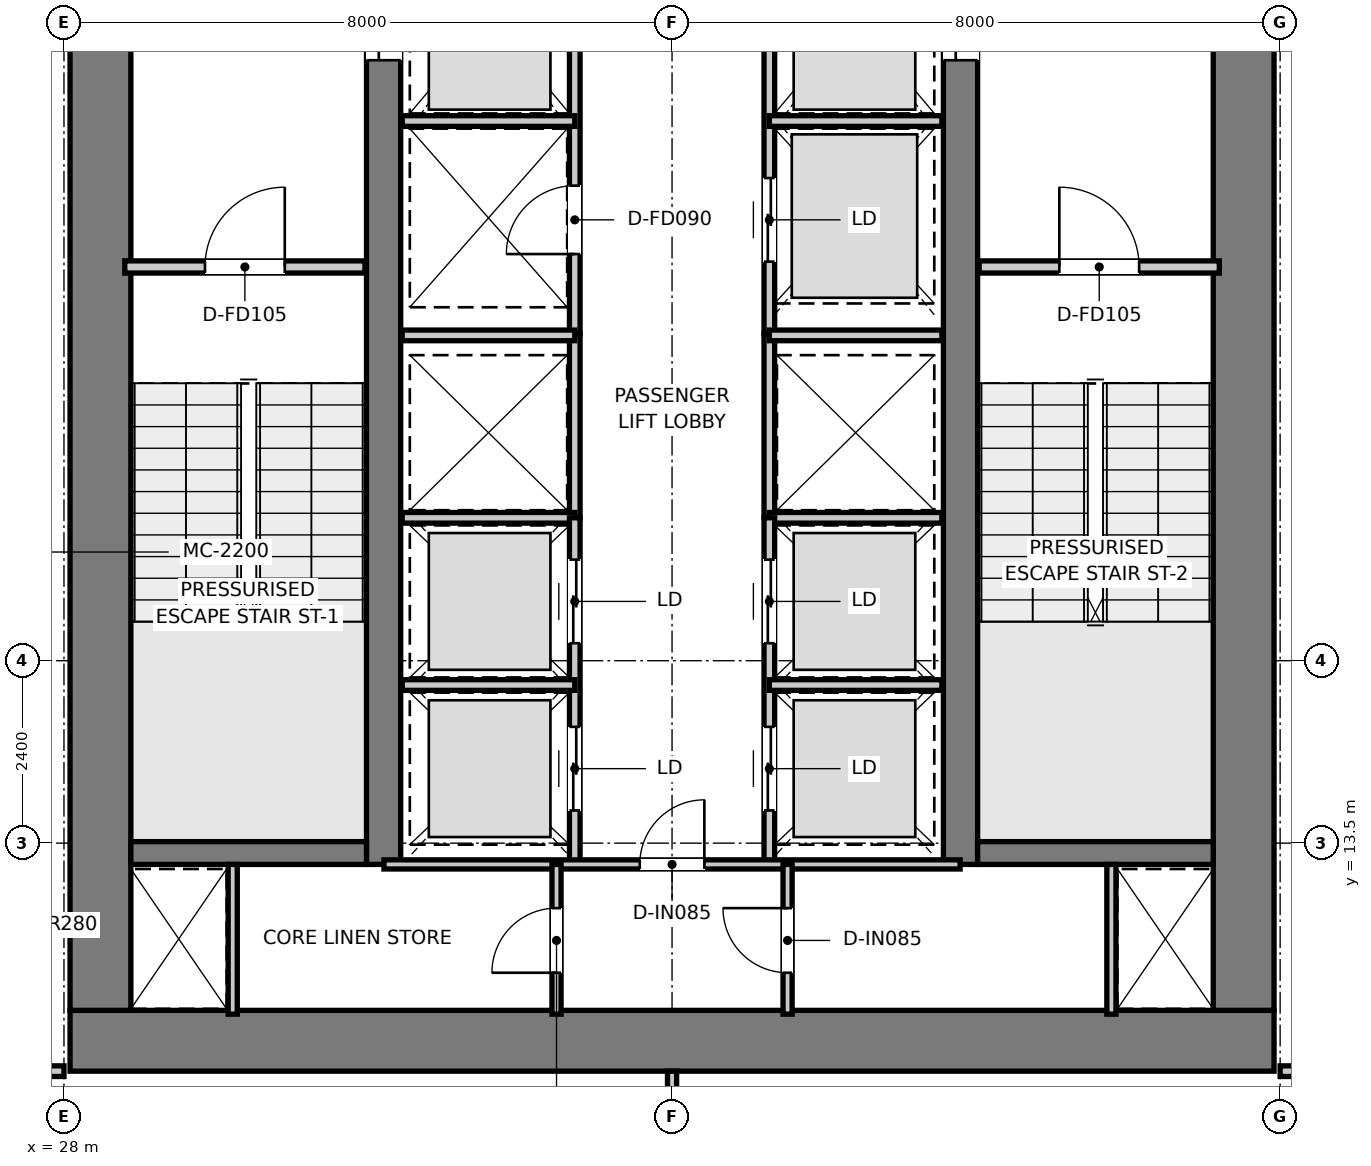
"""IFC4 building model, lengths in metres.
Left out: names, types, materials, properties, quantities, classifications, styles, units other than length and angle.
Written with IfcOpenShell. Run it as: python <this file> out.ifc"""

import sys

from ifc_helpers import new_model, si_unit, direction, frame, frame_2d, origin, place, context, subcontext, project, spatial, rectangle, extrude, element, fill, save


model = new_model("IFC4")
c1 = context("Model", 3, precision=1e-05, world=origin(), true_north=direction((0.0, 1.0)))
c2 = subcontext(c1, "Body", "Model", "MODEL_VIEW")
j1 = project(units=[si_unit("LENGTHUNIT", "METRE"), si_unit("PLANEANGLEUNIT", "RADIAN")], contexts=[c1])
p1 = place(None, origin())
s1 = spatial("IfcSite", under=j1, at=p1, CompositionType="ELEMENT")
p2 = place(p1, origin())
s2 = spatial("IfcBuilding", under=s1, at=p2, CompositionType="ELEMENT")
p3 = place(p2, frame((0.0, 0.0, 72.4)))
s3 = spatial("IfcBuildingStorey", under=s2, at=p3, CompositionType="ELEMENT", Elevation=72.4)
p4 = place(p3, frame((28.08, 10.9, 0.0), z_axis=(0.0, 0.0, 1.0), x_axis=(1.0, 0.0, 0.0)))
e1 = element("IfcWall", 1, at=p4, inside=s3, PredefinedType="SHEAR", context=c2, shape_type="SweptSolid", body=[
    extrude(rectangle(XDim=15.84, YDim=0.8, at=frame_2d((7.92, 0.0))), origin(), (0.0, 0.0, 1.0), 3.95),
])
for number, where, z_axis, x_axis in (
    (2, (28.48, 11.3, 0.0), (0.0, 0.0, 1.0), (0.0, 1.0, 0.0)),
    (3, (43.52, 11.3, 0.0), (0.0, 0.0, 1.0), (0.0, 1.0, 0.0)),
):
    element("IfcWall", number, at=place(p3, frame(where, z_axis=z_axis, x_axis=x_axis)), inside=s3, PredefinedType="SHEAR", context=c2, shape_type="SweptSolid", body=[
        extrude(rectangle(XDim=14.7, YDim=0.8, at=frame_2d((7.35, 0.0))), origin(), (0.0, 0.0, 1.0), 3.95),
    ])
p5 = place(p3, frame((32.205, 13.22, 0.0), z_axis=(0.0, 0.0, 1.0), x_axis=(0.0, 1.0, 0.0)))
e4 = element("IfcWall", 4, at=p5, inside=s3, PredefinedType="SHEAR", context=c2, shape_type="SweptSolid", body=[
    extrude(rectangle(XDim=12.78, YDim=0.45, at=frame_2d((6.39, 0.0))), origin(), (0.0, 0.0, 1.0), 3.95),
])
p6 = place(p5, frame((10.58, 0.0, 0.0)))
e5 = element("IfcOpeningElement", 5, at=p6, cuts=e4, PredefinedType="OPENING", context=c2, shape_type="SweptSolid", body=[
    extrude(rectangle(XDim=1.1, YDim=2.15, at=frame_2d((0.55, 1.075))), frame((0.0, 0.235, 0.0), z_axis=(0.0, -1.0, 0.0), x_axis=(1.0, 0.0, 0.0)), (0.0, 0.0, 1.0), 0.47),
])
p7 = place(p3, frame((39.795, 13.22, 0.0), z_axis=(0.0, 0.0, 1.0), x_axis=(0.0, 1.0, 0.0)))
e6 = element("IfcWall", 6, at=p7, inside=s3, PredefinedType="SHEAR", context=c2, shape_type="SweptSolid", body=[
    extrude(rectangle(XDim=12.78, YDim=0.45, at=frame_2d((6.39, 0.0))), origin(), (0.0, 0.0, 1.0), 3.95),
])
p8 = place(p7, frame((10.58, 0.0, 0.0)))
e7 = element("IfcOpeningElement", 7, at=p8, cuts=e6, PredefinedType="OPENING", context=c2, shape_type="SweptSolid", body=[
    extrude(rectangle(XDim=1.1, YDim=2.15, at=frame_2d((0.55, 1.075))), frame((0.0, 0.235, 0.0), z_axis=(0.0, -1.0, 0.0), x_axis=(1.0, 0.0, 0.0)), (0.0, 0.0, 1.0), 0.47),
])
for number, where, z_axis, x_axis in (
    (8, (28.88, 13.37, 0.0), (0.0, 0.0, 1.0), (1.0, 0.0, 0.0)),
    (9, (40.02, 13.37, 0.0), (0.0, 0.0, 1.0), (1.0, 0.0, 0.0)),
):
    element("IfcWall", number, at=place(p3, frame(where, z_axis=z_axis, x_axis=x_axis)), inside=s3, PredefinedType="SHEAR", context=c2, shape_type="SweptSolid", body=[
        extrude(rectangle(XDim=3.1, YDim=0.3, at=frame_2d((1.55, 0.0))), origin(), (0.0, 0.0, 1.0), 3.95),
    ])
p9 = place(p3, frame((28.8, 21.08, 0.0), z_axis=(0.0, 0.0, 1.0), x_axis=(1.0, 0.0, 0.0)))
e10 = element("IfcWall", 10, at=p9, inside=s3, PredefinedType="PARTITIONING", context=c2, shape_type="SweptSolid", body=[
    extrude(rectangle(XDim=3.16, YDim=0.16, at=frame_2d((1.58, 0.0))), origin(), (0.0, 0.0, 1.0), 3.67),
])
p10 = place(p9, frame((1.055, 0.0, 0.0)))
e11 = element("IfcOpeningElement", 11, at=p10, cuts=e10, PredefinedType="OPENING", context=c2, shape_type="SweptSolid", body=[
    extrude(rectangle(XDim=1.05, YDim=2.1, at=frame_2d((0.525, 1.05))), frame((0.0, 0.09, 0.0), z_axis=(0.0, -1.0, 0.0), x_axis=(1.0, 0.0, 0.0)), (0.0, 0.0, 1.0), 0.18),
])
p11 = place(p3, frame((40.04, 21.08, 0.0), z_axis=(0.0, 0.0, 1.0), x_axis=(1.0, 0.0, 0.0)))
e12 = element("IfcWall", 12, at=p11, inside=s3, PredefinedType="PARTITIONING", context=c2, shape_type="SweptSolid", body=[
    extrude(rectangle(XDim=3.16, YDim=0.16, at=frame_2d((1.58, 0.0))), origin(), (0.0, 0.0, 1.0), 3.67),
])
p12 = place(p11, frame((1.055, 0.0, 0.0)))
e13 = element("IfcOpeningElement", 13, at=p12, cuts=e12, PredefinedType="OPENING", context=c2, shape_type="SweptSolid", body=[
    extrude(rectangle(XDim=1.05, YDim=2.1, at=frame_2d((0.525, 1.05))), frame((0.0, 0.09, 0.0), z_axis=(0.0, -1.0, 0.0), x_axis=(1.0, 0.0, 0.0)), (0.0, 0.0, 1.0), 0.18),
])
p13 = place(p3, frame((34.72, 20.2, 0.0), z_axis=(0.0, 0.0, 1.0), x_axis=(0.0, 1.0, 0.0)))
e14 = element("IfcWall", 14, at=p13, inside=s3, PredefinedType="PARTITIONING", context=c2, shape_type="SweptSolid", body=[
    extrude(rectangle(XDim=5.78, YDim=0.14, at=frame_2d((2.89, 0.0))), origin(), (0.0, 0.0, 1.0), 2.47),
])
p14 = place(p13, frame((1.05, 0.0, 0.0)))
e15 = element("IfcOpeningElement", 15, at=p14, cuts=e14, PredefinedType="OPENING", context=c2, shape_type="SweptSolid", body=[
    extrude(rectangle(XDim=0.9, YDim=2.1, at=frame_2d((0.45, 1.05))), frame((0.0, 0.08, 0.0), z_axis=(0.0, -1.0, 0.0), x_axis=(1.0, 0.0, 0.0)), (0.0, 0.0, 1.0), 0.16),
])
p15 = place(p3, frame((37.28, 20.2, 0.0), z_axis=(0.0, 0.0, 1.0), x_axis=(0.0, 1.0, 0.0)))
e16 = element("IfcWall", 16, at=p15, inside=s3, PredefinedType="PARTITIONING", context=c2, shape_type="SweptSolid", body=[
    extrude(rectangle(XDim=5.78, YDim=0.14, at=frame_2d((2.89, 0.0))), origin(), (0.0, 0.0, 1.0), 2.47),
])
p16 = place(p15, frame((0.95, 0.0, 0.0)))
e17 = element("IfcOpeningElement", 17, at=p16, cuts=e16, PredefinedType="OPENING", context=c2, shape_type="SweptSolid", body=[
    extrude(rectangle(XDim=1.1, YDim=2.15, at=frame_2d((0.55, 1.075))), frame((0.0, 0.08, 0.0), z_axis=(0.0, -1.0, 0.0), x_axis=(1.0, 0.0, 0.0)), (0.0, 0.0, 1.0), 0.16),
])
for number, where, z_axis, x_axis in (
    (18, (32.45, 23.0, 0.0), (0.0, 0.0, 1.0), (1.0, 0.0, 0.0)),
    (19, (37.28, 23.0, 0.0), (0.0, 0.0, 1.0), (1.0, 0.0, 0.0)),
):
    element("IfcWall", number, at=place(p3, frame(where, z_axis=z_axis, x_axis=x_axis)), inside=s3, PredefinedType="PARTITIONING", context=c2, shape_type="SweptSolid", body=[
        extrude(rectangle(XDim=2.27, YDim=0.14, at=frame_2d((1.135, 0.0))), origin(), (0.0, 0.0, 1.0), 2.47),
    ])
for number, where, z_axis, x_axis in (
    (20, (34.72, 17.78, 0.0), (0.0, 0.0, 1.0), (0.0, 1.0, 0.0)),
    (21, (37.28, 17.78, 0.0), (0.0, 0.0, 1.0), (0.0, 1.0, 0.0)),
):
    element("IfcWall", number, at=place(p3, frame(where, z_axis=z_axis, x_axis=x_axis)), inside=s3, PredefinedType="PARTITIONING", context=c2, shape_type="SweptSolid", body=[
        extrude(rectangle(XDim=2.42, YDim=0.14, at=frame_2d((1.21, 0.0))), origin(), (0.0, 0.0, 1.0), 3.67),
    ])
for number, where, z_axis, x_axis in (
    (22, (32.45, 17.78, 0.0), (0.0, 0.0, 1.0), (1.0, 0.0, 0.0)),
    (23, (32.45, 20.18, 0.0), (0.0, 0.0, 1.0), (1.0, 0.0, 0.0)),
    (24, (37.28, 17.78, 0.0), (0.0, 0.0, 1.0), (1.0, 0.0, 0.0)),
    (25, (37.28, 20.18, 0.0), (0.0, 0.0, 1.0), (1.0, 0.0, 0.0)),
):
    element("IfcWall", number, at=place(p3, frame(where, z_axis=z_axis, x_axis=x_axis)), inside=s3, PredefinedType="PARTITIONING", context=c2, shape_type="SweptSolid", body=[
        extrude(rectangle(XDim=2.27, YDim=0.14, at=frame_2d((1.135, 0.0))), origin(), (0.0, 0.0, 1.0), 3.67),
    ])
p17 = place(p3, frame((34.72, 13.22, 0.0), z_axis=(0.0, 0.0, 1.0), x_axis=(0.0, 1.0, 0.0)))
e26 = element("IfcWall", 26, at=p17, inside=s3, PredefinedType="PARTITIONING", context=c2, shape_type="SweptSolid", body=[
    extrude(rectangle(XDim=4.56, YDim=0.14, at=frame_2d((2.28, 0.0))), origin(), (0.0, 0.0, 1.0), 3.67),
])
p18 = place(p17, frame((0.71, 0.0, 0.0)))
e27 = element("IfcOpeningElement", 27, at=p18, cuts=e26, PredefinedType="OPENING", context=c2, shape_type="SweptSolid", body=[
    extrude(rectangle(XDim=1.1, YDim=2.15, at=frame_2d((0.55, 1.075))), frame((0.0, 0.08, 0.0), z_axis=(0.0, -1.0, 0.0), x_axis=(1.0, 0.0, 0.0)), (0.0, 0.0, 1.0), 0.16),
])
p19 = place(p17, frame((2.91, 0.0, 0.0)))
e28 = element("IfcOpeningElement", 28, at=p19, cuts=e26, PredefinedType="OPENING", context=c2, shape_type="SweptSolid", body=[
    extrude(rectangle(XDim=1.1, YDim=2.15, at=frame_2d((0.55, 1.075))), frame((0.0, 0.08, 0.0), z_axis=(0.0, -1.0, 0.0), x_axis=(1.0, 0.0, 0.0)), (0.0, 0.0, 1.0), 0.16),
])
p20 = place(p3, frame((32.45, 15.58, 0.0), z_axis=(0.0, 0.0, 1.0), x_axis=(1.0, 0.0, 0.0)))
e29 = element("IfcWall", 29, at=p20, inside=s3, PredefinedType="PARTITIONING", context=c2, shape_type="SweptSolid", body=[
    extrude(rectangle(XDim=2.27, YDim=0.14, at=frame_2d((1.135, 0.0))), origin(), (0.0, 0.0, 1.0), 3.67),
])
p21 = place(p3, frame((37.28, 13.22, 0.0), z_axis=(0.0, 0.0, 1.0), x_axis=(0.0, 1.0, 0.0)))
e30 = element("IfcWall", 30, at=p21, inside=s3, PredefinedType="PARTITIONING", context=c2, shape_type="SweptSolid", body=[
    extrude(rectangle(XDim=4.56, YDim=0.14, at=frame_2d((2.28, 0.0))), origin(), (0.0, 0.0, 1.0), 3.67),
])
p22 = place(p21, frame((0.71, 0.0, 0.0)))
e31 = element("IfcOpeningElement", 31, at=p22, cuts=e30, PredefinedType="OPENING", context=c2, shape_type="SweptSolid", body=[
    extrude(rectangle(XDim=1.1, YDim=2.15, at=frame_2d((0.55, 1.075))), frame((0.0, 0.08, 0.0), z_axis=(0.0, -1.0, 0.0), x_axis=(1.0, 0.0, 0.0)), (0.0, 0.0, 1.0), 0.16),
])
p23 = place(p21, frame((2.91, 0.0, 0.0)))
e32 = element("IfcOpeningElement", 32, at=p23, cuts=e30, PredefinedType="OPENING", context=c2, shape_type="SweptSolid", body=[
    extrude(rectangle(XDim=1.1, YDim=2.15, at=frame_2d((0.55, 1.075))), frame((0.0, 0.08, 0.0), z_axis=(0.0, -1.0, 0.0), x_axis=(1.0, 0.0, 0.0)), (0.0, 0.0, 1.0), 0.16),
])
p24 = place(p3, frame((37.28, 15.58, 0.0), z_axis=(0.0, 0.0, 1.0), x_axis=(1.0, 0.0, 0.0)))
e33 = element("IfcWall", 33, at=p24, inside=s3, PredefinedType="PARTITIONING", context=c2, shape_type="SweptSolid", body=[
    extrude(rectangle(XDim=2.27, YDim=0.14, at=frame_2d((1.135, 0.0))), origin(), (0.0, 0.0, 1.0), 3.67),
])
for number, where, z_axis, x_axis in (
    (34, (30.22, 11.25, 0.0), (0.0, 0.0, 1.0), (0.0, 1.0, 0.0)),
    (35, (41.78, 11.25, 0.0), (0.0, 0.0, 1.0), (0.0, 1.0, 0.0)),
):
    element("IfcWall", number, at=place(p3, frame(where, z_axis=z_axis, x_axis=x_axis)), inside=s3, PredefinedType="PARTITIONING", context=c2, shape_type="SweptSolid", body=[
        extrude(rectangle(XDim=1.97, YDim=0.12, at=frame_2d((0.985, 0.0))), origin(), (0.0, 0.0, 1.0), 3.67),
    ])
p25 = place(p3, frame((32.21, 13.22, 0.0), z_axis=(0.0, 0.0, 1.0), x_axis=(1.0, 0.0, 0.0)))
e36 = element("IfcWall", 36, at=p25, inside=s3, PredefinedType="PARTITIONING", context=c2, shape_type="SweptSolid", body=[
    extrude(rectangle(XDim=7.58, YDim=0.12, at=frame_2d((3.79, 0.0))), origin(), (0.0, 0.0, 1.0), 3.67),
])
p26 = place(p25, frame((3.365, 0.0, 0.0)))
e37 = element("IfcOpeningElement", 37, at=p26, cuts=e36, PredefinedType="OPENING", context=c2, shape_type="SweptSolid", body=[
    extrude(rectangle(XDim=0.85, YDim=2.1, at=frame_2d((0.425, 1.05))), frame((0.0, 0.07, 0.0), z_axis=(0.0, -1.0, 0.0), x_axis=(1.0, 0.0, 0.0)), (0.0, 0.0, 1.0), 0.14),
])
p27 = place(p3, frame((34.48, 11.25, 0.0), z_axis=(0.0, 0.0, 1.0), x_axis=(0.0, 1.0, 0.0)))
e38 = element("IfcWall", 38, at=p27, inside=s3, PredefinedType="PARTITIONING", context=c2, shape_type="SweptSolid", body=[
    extrude(rectangle(XDim=1.97, YDim=0.12, at=frame_2d((0.985, 0.0))), origin(), (0.0, 0.0, 1.0), 3.67),
])
p28 = place(p27, frame((0.545, 0.0, 0.0)))
e39 = element("IfcOpeningElement", 39, at=p28, cuts=e38, PredefinedType="OPENING", context=c2, shape_type="SweptSolid", body=[
    extrude(rectangle(XDim=0.85, YDim=2.1, at=frame_2d((0.425, 1.05))), frame((0.0, 0.07, 0.0), z_axis=(0.0, -1.0, 0.0), x_axis=(1.0, 0.0, 0.0)), (0.0, 0.0, 1.0), 0.14),
])
p29 = place(p3, frame((37.52, 11.25, 0.0), z_axis=(0.0, 0.0, 1.0), x_axis=(0.0, 1.0, 0.0)))
e40 = element("IfcWall", 40, at=p29, inside=s3, PredefinedType="PARTITIONING", context=c2, shape_type="SweptSolid", body=[
    extrude(rectangle(XDim=1.97, YDim=0.12, at=frame_2d((0.985, 0.0))), origin(), (0.0, 0.0, 1.0), 3.67),
])
p30 = place(p29, frame((0.545, 0.0, 0.0)))
e41 = element("IfcOpeningElement", 41, at=p30, cuts=e40, PredefinedType="OPENING", context=c2, shape_type="SweptSolid", body=[
    extrude(rectangle(XDim=0.85, YDim=2.1, at=frame_2d((0.425, 1.05))), frame((0.0, 0.07, 0.0), z_axis=(0.0, -1.0, 0.0), x_axis=(1.0, 0.0, 0.0)), (0.0, 0.0, 1.0), 0.14),
])
p31 = place(p3, frame((26.32, 10.5, 0.0), z_axis=(0.0, 0.0, 1.0), x_axis=(1.0, 0.0, 0.0)))
e42 = element("IfcWall", 42, at=p31, inside=s3, PredefinedType="PARTITIONING", context=c2, shape_type="SweptSolid", body=[
    extrude(rectangle(XDim=1.68, YDim=0.14, at=frame_2d((0.84, 0.0))), origin(), (0.0, 0.0, 1.0), 3.67),
])
p32 = place(p31, frame((0.445, 0.0, 0.0)))
e43 = element("IfcOpeningElement", 43, at=p32, cuts=e42, PredefinedType="OPENING", context=c2, shape_type="SweptSolid", body=[
    extrude(rectangle(XDim=0.85, YDim=2.1, at=frame_2d((0.425, 1.05))), frame((0.0, 0.08, 0.0), z_axis=(0.0, -1.0, 0.0), x_axis=(1.0, 0.0, 0.0)), (0.0, 0.0, 1.0), 0.16),
])
p33 = place(p3, frame((44.0, 10.5, 0.0), z_axis=(0.0, 0.0, 1.0), x_axis=(1.0, 0.0, 0.0)))
e44 = element("IfcWall", 44, at=p33, inside=s3, PredefinedType="PARTITIONING", context=c2, shape_type="SweptSolid", body=[
    extrude(rectangle(XDim=1.68, YDim=0.14, at=frame_2d((0.84, 0.0))), origin(), (0.0, 0.0, 1.0), 3.67),
])
p34 = place(p33, frame((0.385, 0.0, 0.0)))
e45 = element("IfcOpeningElement", 45, at=p34, cuts=e44, PredefinedType="OPENING", context=c2, shape_type="SweptSolid", body=[
    extrude(rectangle(XDim=0.85, YDim=2.1, at=frame_2d((0.425, 1.05))), frame((0.0, 0.08, 0.0), z_axis=(0.0, -1.0, 0.0), x_axis=(1.0, 0.0, 0.0)), (0.0, 0.0, 1.0), 0.16),
])
p35 = place(p3, frame((36.0, 1.513, 0.0), z_axis=(0.0, 0.0, 1.0), x_axis=(0.0, 1.0, 0.0)))
e46 = element("IfcWall", 46, at=p35, inside=s3, PredefinedType="PARTITIONING", context=c2, shape_type="SweptSolid", body=[
    extrude(rectangle(XDim=8.987, YDim=0.12, at=frame_2d((4.493, 0.0))), origin(), (0.0, 0.0, 1.0), 3.67),
])
p36 = place(p10, origin())
e47 = element("IfcDoor", 47, at=p36, inside=s3, OperationType="SINGLE_SWING_RIGHT", PredefinedType="DOOR", context=c2, shape_type="SweptSolid", body=[
    extrude(rectangle(XDim=1.05, YDim=2.1, at=frame_2d((0.525, 1.05))), frame((0.0, 0.025, 0.0), z_axis=(0.0, -1.0, 0.0), x_axis=(1.0, 0.0, 0.0)), (0.0, 0.0, 1.0), 0.05),
])
fill(e11, e47)
p37 = place(p12, origin())
e48 = element("IfcDoor", 48, at=p37, inside=s3, OperationType="SINGLE_SWING_LEFT", PredefinedType="DOOR", context=c2, shape_type="SweptSolid", body=[
    extrude(rectangle(XDim=1.05, YDim=2.1, at=frame_2d((0.525, 1.05))), frame((0.0, 0.025, 0.0), z_axis=(0.0, -1.0, 0.0), x_axis=(1.0, 0.0, 0.0)), (0.0, 0.0, 1.0), 0.05),
])
fill(e13, e48)
p38 = place(p6, origin())
e49 = element("IfcDoor", 49, at=p38, inside=s3, OperationType="DOUBLE_DOOR_SLIDING", PredefinedType="DOOR", context=c2, shape_type="SweptSolid", body=[
    extrude(rectangle(XDim=1.1, YDim=2.15, at=frame_2d((0.55, 1.075))), frame((0.0, 0.025, 0.0), z_axis=(0.0, -1.0, 0.0), x_axis=(1.0, 0.0, 0.0)), (0.0, 0.0, 1.0), 0.05),
])
fill(e5, e49)
p39 = place(p8, origin())
e50 = element("IfcDoor", 50, at=p39, inside=s3, OperationType="DOUBLE_DOOR_SLIDING", PredefinedType="DOOR", context=c2, shape_type="SweptSolid", body=[
    extrude(rectangle(XDim=1.1, YDim=2.15, at=frame_2d((0.55, 1.075))), frame((0.0, 0.025, 0.0), z_axis=(0.0, -1.0, 0.0), x_axis=(1.0, 0.0, 0.0)), (0.0, 0.0, 1.0), 0.05),
])
fill(e7, e50)
p40 = place(p14, origin())
e51 = element("IfcDoor", 51, at=p40, inside=s3, OperationType="SINGLE_SWING_LEFT", PredefinedType="DOOR", context=c2, shape_type="SweptSolid", body=[
    extrude(rectangle(XDim=0.9, YDim=2.1, at=frame_2d((0.45, 1.05))), frame((0.0, 0.025, 0.0), z_axis=(0.0, -1.0, 0.0), x_axis=(1.0, 0.0, 0.0)), (0.0, 0.0, 1.0), 0.05),
])
fill(e15, e51)
p41 = place(p16, origin())
e52 = element("IfcDoor", 52, at=p41, inside=s3, OperationType="DOUBLE_DOOR_SLIDING", PredefinedType="DOOR", context=c2, shape_type="SweptSolid", body=[
    extrude(rectangle(XDim=1.1, YDim=2.15, at=frame_2d((0.55, 1.075))), frame((0.0, 0.025, 0.0), z_axis=(0.0, -1.0, 0.0), x_axis=(1.0, 0.0, 0.0)), (0.0, 0.0, 1.0), 0.05),
])
fill(e17, e52)
p42 = place(p18, origin())
e53 = element("IfcDoor", 53, at=p42, inside=s3, OperationType="DOUBLE_DOOR_SLIDING", PredefinedType="DOOR", context=c2, shape_type="SweptSolid", body=[
    extrude(rectangle(XDim=1.1, YDim=2.15, at=frame_2d((0.55, 1.075))), frame((0.0, 0.025, 0.0), z_axis=(0.0, -1.0, 0.0), x_axis=(1.0, 0.0, 0.0)), (0.0, 0.0, 1.0), 0.05),
])
fill(e27, e53)
p43 = place(p19, origin())
e54 = element("IfcDoor", 54, at=p43, inside=s3, OperationType="DOUBLE_DOOR_SLIDING", PredefinedType="DOOR", context=c2, shape_type="SweptSolid", body=[
    extrude(rectangle(XDim=1.1, YDim=2.15, at=frame_2d((0.55, 1.075))), frame((0.0, 0.025, 0.0), z_axis=(0.0, -1.0, 0.0), x_axis=(1.0, 0.0, 0.0)), (0.0, 0.0, 1.0), 0.05),
])
fill(e28, e54)
p44 = place(p22, origin())
e55 = element("IfcDoor", 55, at=p44, inside=s3, OperationType="DOUBLE_DOOR_SLIDING", PredefinedType="DOOR", context=c2, shape_type="SweptSolid", body=[
    extrude(rectangle(XDim=1.1, YDim=2.15, at=frame_2d((0.55, 1.075))), frame((0.0, 0.025, 0.0), z_axis=(0.0, -1.0, 0.0), x_axis=(1.0, 0.0, 0.0)), (0.0, 0.0, 1.0), 0.05),
])
fill(e31, e55)
p45 = place(p23, origin())
e56 = element("IfcDoor", 56, at=p45, inside=s3, OperationType="DOUBLE_DOOR_SLIDING", PredefinedType="DOOR", context=c2, shape_type="SweptSolid", body=[
    extrude(rectangle(XDim=1.1, YDim=2.15, at=frame_2d((0.55, 1.075))), frame((0.0, 0.025, 0.0), z_axis=(0.0, -1.0, 0.0), x_axis=(1.0, 0.0, 0.0)), (0.0, 0.0, 1.0), 0.05),
])
fill(e32, e56)
p46 = place(p26, origin())
e57 = element("IfcDoor", 57, at=p46, inside=s3, OperationType="SINGLE_SWING_RIGHT", PredefinedType="DOOR", context=c2, shape_type="SweptSolid", body=[
    extrude(rectangle(XDim=0.85, YDim=2.1, at=frame_2d((0.425, 1.05))), frame((0.0, 0.025, 0.0), z_axis=(0.0, -1.0, 0.0), x_axis=(1.0, 0.0, 0.0)), (0.0, 0.0, 1.0), 0.05),
])
fill(e37, e57)
p47 = place(p28, origin())
e58 = element("IfcDoor", 58, at=p47, inside=s3, OperationType="SINGLE_SWING_LEFT", PredefinedType="DOOR", context=c2, shape_type="SweptSolid", body=[
    extrude(rectangle(XDim=0.85, YDim=2.1, at=frame_2d((0.425, 1.05))), frame((0.0, 0.025, 0.0), z_axis=(0.0, -1.0, 0.0), x_axis=(1.0, 0.0, 0.0)), (0.0, 0.0, 1.0), 0.05),
])
fill(e39, e58)
p48 = place(p30, origin())
e59 = element("IfcDoor", 59, at=p48, inside=s3, OperationType="SINGLE_SWING_RIGHT", PredefinedType="DOOR", context=c2, shape_type="SweptSolid", body=[
    extrude(rectangle(XDim=0.85, YDim=2.1, at=frame_2d((0.425, 1.05))), frame((0.0, 0.025, 0.0), z_axis=(0.0, -1.0, 0.0), x_axis=(1.0, 0.0, 0.0)), (0.0, 0.0, 1.0), 0.05),
])
fill(e41, e59)
save(model, sys.argv[1])
